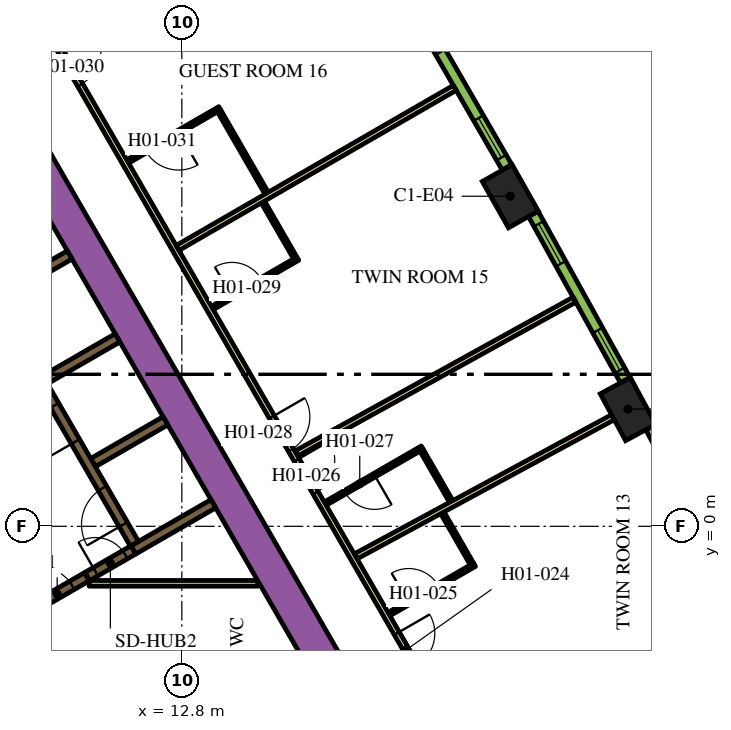
"""IFC4 building model, lengths in metres.
Left out: names, types, materials, properties, quantities, classifications, styles, units other than length and angle.
Written with IfcOpenShell. Run it as: python <this file> out.ifc"""

import sys

from ifc_helpers import new_model, si_unit, direction, frame, frame_2d, origin, origin_2d, place, context, subcontext, project, spatial, rectangle, extrude, element, fill, save


model = new_model("IFC4")
c1 = context("Model", 3, precision=1e-05, world=origin(), true_north=direction((0.0, 1.0)))
c2 = subcontext(c1, "Body", "Model", "MODEL_VIEW")
j1 = project(units=[si_unit("LENGTHUNIT", "METRE"), si_unit("PLANEANGLEUNIT", "RADIAN")], contexts=[c1])
p1 = place(None, origin())
s1 = spatial("IfcSite", under=j1, at=p1, CompositionType="ELEMENT")
p2 = place(p1, origin())
s2 = spatial("IfcBuilding", under=s1, at=p2, CompositionType="ELEMENT")
p3 = place(p2, frame((0.0, 0.0, 27.6)))
s3 = spatial("IfcBuildingStorey", under=s2, at=p3, CompositionType="ELEMENT", Elevation=27.6)
for number, where, z_axis, x_axis in (
    (1, (24.54, 3.085, 0.0), (0.0, 0.0, 1.0), (-0.476, 0.88, 0.0)),
    (2, (21.443, 8.685, 0.0), (0.0, 0.0, 1.0), (-0.492, 0.871, 0.0)),
):
    element("IfcColumn", number, at=place(p3, frame(where, z_axis=z_axis, x_axis=x_axis)), inside=s3, PredefinedType="COLUMN", context=c2, shape_type="SweptSolid", body=[
        extrude(rectangle(XDim=1.4, YDim=0.9, at=origin_2d()), origin(), (0.0, 0.0, 1.0), 3.9),
    ])
p4 = place(p3, frame((6.776, 13.364, 0.0), z_axis=(0.0, 0.0, 1.0), x_axis=(0.500004177138, -0.8660229921, 0.0)))
e3 = element("IfcWall", 3, at=p4, inside=s3, PredefinedType="SOLIDWALL", context=c2, shape_type="SweptSolid", body=[
    extrude(rectangle(XDim=20.204, YDim=0.9, at=frame_2d((10.102, 0.0))), origin(), (0.0, 0.0, 1.0), 3.9),
])
p5 = place(p3, frame((8.334, -2.964, 0.0), z_axis=(0.0, 0.0, 1.0), x_axis=(0.866016039709, -0.500016218704, 0.0)))
e4 = element("IfcWall", 4, at=p5, inside=s3, PredefinedType="SOLIDWALL", context=c2, shape_type="SweptSolid", body=[
    extrude(rectangle(XDim=7.05, YDim=0.25, at=frame_2d((3.525, 0.0))), origin(), (0.0, 0.0, 1.0), 3.9),
])
p6 = place(p3, frame((10.464, 1.677, 0.0), z_axis=(0.0, 0.0, 1.0), x_axis=(0.86605622881, 0.499946605688, 0.0)))
e5 = element("IfcWall", 5, at=p6, inside=s3, PredefinedType="SOLIDWALL", context=c2, shape_type="SweptSolid", body=[
    extrude(rectangle(XDim=2.2, YDim=0.25, at=frame_2d((1.1, 0.0))), origin(), (0.0, 0.0, 1.0), 3.9),
])
p7 = place(p3, frame((13.629, 0.594, 0.0), z_axis=(0.0, 0.0, 1.0), x_axis=(-0.866063384774, -0.499934209226, 0.0)))
e6 = element("IfcWall", 6, at=p7, inside=s3, PredefinedType="SOLIDWALL", context=c2, shape_type="SweptSolid", body=[
    extrude(rectangle(XDim=2.428, YDim=0.25, at=frame_2d((1.214, 0.0))), origin(), (0.0, 0.0, 1.0), 3.9),
])
for number, where, z_axis, x_axis in (
    (7, (7.944, 6.041, 0.0), (0.0, 0.0, 1.0), (0.866, 0.5, 0.0)),
    (8, (9.204, 3.859, 0.0), (0.0, 0.0, 1.0), (0.866, 0.5, 0.0)),
):
    element("IfcWall", number, at=place(p3, frame(where, z_axis=z_axis, x_axis=x_axis)), inside=s3, PredefinedType="SOLIDWALL", context=c2, shape_type="SweptSolid", body=[
        extrude(rectangle(XDim=2.2, YDim=0.25, at=frame_2d((1.1, 0.0))), origin(), (0.0, 0.0, 1.0), 3.9),
    ])
p8 = place(p3, frame((10.362, -1.5, 0.0), z_axis=(0.0, 0.0, 1.0), x_axis=(1.0, 0.0, 0.0)))
e9 = element("IfcWall", 9, at=p8, inside=s3, PredefinedType="PARTITIONING", context=c2, shape_type="SweptSolid", body=[
    extrude(rectangle(XDim=4.439, YDim=0.15, at=frame_2d((2.22, 0.0))), origin(), (0.0, 0.0, 1.0), 2.75),
])
p9 = place(p3, frame((11.553, -0.46, 0.0), z_axis=(0.0, 0.0, 1.0), x_axis=(-0.500006514828, 0.866021642414, 0.0)))
e10 = element("IfcWall", 10, at=p9, inside=s3, PredefinedType="SOLIDWALL", context=c2, shape_type="SweptSolid", body=[
    extrude(rectangle(XDim=12.35, YDim=0.25, at=frame_2d((6.175, 0.0))), origin(), (0.0, 0.0, 1.0), 3.9),
])
p10 = place(p9, frame((0.585, 0.0, 0.0)))
e11 = element("IfcOpeningElement", 11, at=p10, cuts=e10, PredefinedType="OPENING", context=c2, shape_type="SweptSolid", body=[
    extrude(rectangle(XDim=1.1, YDim=2.1, at=frame_2d((0.55, 1.05))), frame((0.0, 0.135, 0.0), z_axis=(0.0, -1.0, 0.0), x_axis=(1.0, 0.0, 0.0)), (0.0, 0.0, 1.0), 0.27),
])
p11 = place(p9, frame((3.105, 0.0, 0.0)))
e12 = element("IfcOpeningElement", 12, at=p11, cuts=e10, PredefinedType="OPENING", context=c2, shape_type="SweptSolid", body=[
    extrude(rectangle(XDim=1.1, YDim=2.1, at=frame_2d((0.55, 1.05))), frame((0.0, 0.135, 0.0), z_axis=(0.0, -1.0, 0.0), x_axis=(1.0, 0.0, 0.0)), (0.0, 0.0, 1.0), 0.27),
])
p12 = place(p9, frame((5.625, 0.0, 0.0)))
e13 = element("IfcOpeningElement", 13, at=p12, cuts=e10, PredefinedType="OPENING", context=c2, shape_type="SweptSolid", body=[
    extrude(rectangle(XDim=1.1, YDim=2.1, at=frame_2d((0.55, 1.05))), frame((0.0, 0.135, 0.0), z_axis=(0.0, -1.0, 0.0), x_axis=(1.0, 0.0, 0.0)), (0.0, 0.0, 1.0), 0.27),
])
p13 = place(p3, frame((8.74, -2.229, 0.0), z_axis=(0.0, 0.0, 1.0), x_axis=(0.865989075817, 0.500062916607, 0.0)))
e14 = element("IfcWall", 14, at=p13, inside=s3, PredefinedType="SOLIDWALL", context=c2, shape_type="SweptSolid", body=[
    extrude(rectangle(XDim=1.8, YDim=0.25, at=frame_2d((0.9, 0.0))), origin(), (0.0, 0.0, 1.0), 3.9),
])
p14 = place(p13, frame((0.45, 0.0, 0.0)))
e15 = element("IfcOpeningElement", 15, at=p14, cuts=e14, PredefinedType="OPENING", context=c2, shape_type="SweptSolid", body=[
    extrude(rectangle(XDim=0.9, YDim=2.1, at=frame_2d((0.45, 1.05))), frame((0.0, 0.135, 0.0), z_axis=(0.0, -1.0, 0.0), x_axis=(1.0, 0.0, 0.0)), (0.0, 0.0, 1.0), 0.27),
])
p15 = place(p3, frame((10.313, -1.32, 0.0), z_axis=(0.0, 0.0, 1.0), x_axis=(0.866034573852, 0.49998411664, 0.0)))
e16 = element("IfcWall", 16, at=p15, inside=s3, PredefinedType="SOLIDWALL", context=c2, shape_type="SweptSolid", body=[
    extrude(rectangle(XDim=1.4, YDim=0.25, at=frame_2d((0.7, 0.0))), origin(), (0.0, 0.0, 1.0), 3.9),
])
p16 = place(p15, frame((0.25, 0.0, 0.0)))
e17 = element("IfcOpeningElement", 17, at=p16, cuts=e16, PredefinedType="OPENING", context=c2, shape_type="SweptSolid", body=[
    extrude(rectangle(XDim=0.9, YDim=2.1, at=frame_2d((0.45, 1.05))), frame((0.0, 0.135, 0.0), z_axis=(0.0, -1.0, 0.0), x_axis=(1.0, 0.0, 0.0)), (0.0, 0.0, 1.0), 0.27),
])
p17 = place(p3, frame((6.163, 18.475, 0.0), z_axis=(0.0, 0.0, 1.0), x_axis=(0.500001317485, -0.866024643133, 0.0)))
e18 = element("IfcWall", 18, at=p17, inside=s3, PredefinedType="PARTITIONING", context=c2, shape_type="SweptSolid", body=[
    extrude(rectangle(XDim=25.767, YDim=0.15, at=frame_2d((12.883, 0.0))), origin(), (0.0, 0.0, 1.0), 2.75),
])
p18 = place(p17, frame((24.586, 0.0, 0.0)))
e19 = element("IfcOpeningElement", 19, at=p18, cuts=e18, PredefinedType="OPENING", context=c2, shape_type="SweptSolid", body=[
    extrude(rectangle(XDim=1.0, YDim=2.1, at=frame_2d((0.5, 1.05))), frame((0.0, 0.085, 0.0), z_axis=(0.0, -1.0, 0.0), x_axis=(1.0, 0.0, 0.0)), (0.0, 0.0, 1.0), 0.17),
])
p19 = place(p17, frame((19.319, 0.0, 0.0)))
e20 = element("IfcOpeningElement", 20, at=p19, cuts=e18, PredefinedType="OPENING", context=c2, shape_type="SweptSolid", body=[
    extrude(rectangle(XDim=1.0, YDim=2.1, at=frame_2d((0.5, 1.05))), frame((0.0, 0.085, 0.0), z_axis=(0.0, -1.0, 0.0), x_axis=(1.0, 0.0, 0.0)), (0.0, 0.0, 1.0), 0.17),
])
p20 = place(p17, frame((18.012, 0.0, 0.0)))
e21 = element("IfcOpeningElement", 21, at=p20, cuts=e18, PredefinedType="OPENING", context=c2, shape_type="SweptSolid", body=[
    extrude(rectangle(XDim=1.0, YDim=2.1, at=frame_2d((0.5, 1.05))), frame((0.0, 0.085, 0.0), z_axis=(0.0, -1.0, 0.0), x_axis=(1.0, 0.0, 0.0)), (0.0, 0.0, 1.0), 0.17),
])
p21 = place(p17, frame((6.824, 0.0, 0.0)))
e22 = element("IfcOpeningElement", 22, at=p21, cuts=e18, PredefinedType="OPENING", context=c2, shape_type="SweptSolid", body=[
    extrude(rectangle(XDim=1.1, YDim=2.1, at=frame_2d((0.55, 1.05))), frame((0.0, 0.085, 0.0), z_axis=(0.0, -1.0, 0.0), x_axis=(1.0, 0.0, 0.0)), (0.0, 0.0, 1.0), 0.17),
])
p22 = place(p17, frame((4.658, 0.0, 0.0)))
e23 = element("IfcOpeningElement", 23, at=p22, cuts=e18, PredefinedType="OPENING", context=c2, shape_type="SweptSolid", body=[
    extrude(rectangle(XDim=0.9, YDim=2.1, at=frame_2d((0.45, 1.05))), frame((0.0, 0.085, 0.0), z_axis=(0.0, -1.0, 0.0), x_axis=(1.0, 0.0, 0.0)), (0.0, 0.0, 1.0), 0.17),
])
p23 = place(p17, frame((0.18, 0.0, 0.0)))
e24 = element("IfcOpeningElement", 24, at=p23, cuts=e18, PredefinedType="OPENING", context=c2, shape_type="SweptSolid", body=[
    extrude(rectangle(XDim=1.0, YDim=2.1, at=frame_2d((0.5, 1.05))), frame((0.0, 0.085, 0.0), z_axis=(0.0, -1.0, 0.0), x_axis=(1.0, 0.0, 0.0)), (0.0, 0.0, 1.0), 0.17),
])
p24 = place(p3, frame((19.982, 11.537, 0.0), z_axis=(0.0, 0.0, 1.0), x_axis=(-0.866020994654, -0.500007636761, 0.0)))
e25 = element("IfcWall", 25, at=p24, inside=s3, PredefinedType="PARTITIONING", context=c2, shape_type="SweptSolid", body=[
    extrude(rectangle(XDim=8.423, YDim=0.15, at=frame_2d((4.211, 0.0))), origin(), (0.0, 0.0, 1.0), 2.75),
])
p25 = place(p3, frame((23.132, 5.962, 0.0), z_axis=(0.0, 0.0, 1.0), x_axis=(-0.875121716713, -0.483902863121, 0.0)))
e26 = element("IfcWall", 26, at=p25, inside=s3, PredefinedType="PARTITIONING", context=c2, shape_type="SweptSolid", body=[
    extrude(rectangle(XDim=8.355, YDim=0.15, at=frame_2d((4.178, 0.0))), origin(), (0.0, 0.0, 1.0), 2.75),
])
p26 = place(p3, frame((27.134, -2.779, 0.0), z_axis=(0.0, 0.0, 1.0), x_axis=(-0.8882049501, -0.459447457951, 0.0)))
e27 = element("IfcWall", 27, at=p26, inside=s3, PredefinedType="PARTITIONING", context=c2, shape_type="SweptSolid", body=[
    extrude(rectangle(XDim=11.638, YDim=0.15, at=frame_2d((5.819, 0.0))), origin(), (0.0, 0.0, 1.0), 2.75),
])
p27 = place(p3, frame((24.145, 2.871, 0.0), z_axis=(0.0, 0.0, 1.0), x_axis=(-0.879551725039, -0.475803281809, 0.0)))
e28 = element("IfcWall", 28, at=p27, inside=s3, PredefinedType="PARTITIONING", context=c2, shape_type="SweptSolid", body=[
    extrude(rectangle(XDim=7.688, YDim=0.15, at=frame_2d((3.844, 0.0))), origin(), (0.0, 0.0, 1.0), 2.75),
])
p28 = place(p3, frame((18.25, -2.311, 0.0), z_axis=(0.0, 0.0, 1.0), x_axis=(0.866021400173, 0.500006934395, 0.0)))
e29 = element("IfcWall", 29, at=p28, inside=s3, PredefinedType="PARTITIONING", context=c2, shape_type="SweptSolid", body=[
    extrude(rectangle(XDim=2.6, YDim=0.1, at=frame_2d((1.3, 0.0))), origin(), (0.0, 0.0, 1.0), 2.75),
])
p29 = place(p28, frame((0.6, 0.0, 0.0)))
e30 = element("IfcOpeningElement", 30, at=p29, cuts=e29, PredefinedType="OPENING", context=c2, shape_type="SweptSolid", body=[
    extrude(rectangle(XDim=0.9, YDim=2.1, at=frame_2d((0.45, 1.05))), frame((0.0, 0.06, 0.0), z_axis=(0.0, -1.0, 0.0), x_axis=(1.0, 0.0, 0.0)), (0.0, 0.0, 1.0), 0.12),
])
p30 = place(p3, frame((20.434, -0.993, 0.0), z_axis=(0.0, 0.0, 1.0), x_axis=(-0.500086022567, 0.865975732936, 0.0)))
e31 = element("IfcWall", 31, at=p30, inside=s3, PredefinedType="PARTITIONING", context=c2, shape_type="SweptSolid", body=[
    extrude(rectangle(XDim=1.55, YDim=0.1, at=frame_2d((0.775, 0.0))), origin(), (0.0, 0.0, 1.0), 2.75),
])
p31 = place(p3, frame((19.127, 2.071, 0.0), z_axis=(0.0, 0.0, 1.0), x_axis=(-0.866003658127, -0.500037662692, 0.0)))
e32 = element("IfcWall", 32, at=p31, inside=s3, PredefinedType="PARTITIONING", context=c2, shape_type="SweptSolid", body=[
    extrude(rectangle(XDim=2.95, YDim=0.1, at=frame_2d((1.475, 0.0))), origin(), (0.0, 0.0, 1.0), 2.75),
])
p32 = place(p31, frame((1.45, 0.0, 0.0)))
e33 = element("IfcOpeningElement", 33, at=p32, cuts=e32, PredefinedType="OPENING", context=c2, shape_type="SweptSolid", body=[
    extrude(rectangle(XDim=0.9, YDim=2.1, at=frame_2d((0.45, 1.05))), frame((0.0, 0.06, 0.0), z_axis=(0.0, -1.0, 0.0), x_axis=(1.0, 0.0, 0.0)), (0.0, 0.0, 1.0), 0.12),
])
p33 = place(p3, frame((19.109, 2.002, 0.0), z_axis=(0.0, 0.0, 1.0), x_axis=(0.500086022567, -0.865975732936, 0.0)))
e34 = element("IfcWall", 34, at=p33, inside=s3, PredefinedType="PARTITIONING", context=c2, shape_type="SweptSolid", body=[
    extrude(rectangle(XDim=1.55, YDim=0.1, at=frame_2d((0.775, 0.0))), origin(), (0.0, 0.0, 1.0), 2.75),
])
p34 = place(p3, frame((13.6, 5.744, 0.0), z_axis=(0.0, 0.0, 1.0), x_axis=(0.866021400173, 0.500006934395, 0.0)))
e35 = element("IfcWall", 35, at=p34, inside=s3, PredefinedType="PARTITIONING", context=c2, shape_type="SweptSolid", body=[
    extrude(rectangle(XDim=2.6, YDim=0.1, at=frame_2d((1.3, 0.0))), origin(), (0.0, 0.0, 1.0), 2.75),
])
p35 = place(p34, frame((0.6, 0.0, 0.0)))
e36 = element("IfcOpeningElement", 36, at=p35, cuts=e35, PredefinedType="OPENING", context=c2, shape_type="SweptSolid", body=[
    extrude(rectangle(XDim=0.9, YDim=2.1, at=frame_2d((0.45, 1.05))), frame((0.0, 0.06, 0.0), z_axis=(0.0, -1.0, 0.0), x_axis=(1.0, 0.0, 0.0)), (0.0, 0.0, 1.0), 0.12),
])
p36 = place(p3, frame((15.779, 7.071, 0.0), z_axis=(0.0, 0.0, 1.0), x_axis=(-0.499976720371, 0.866038843867, 0.0)))
e37 = element("IfcWall", 37, at=p36, inside=s3, PredefinedType="PARTITIONING", context=c2, shape_type="SweptSolid", body=[
    extrude(rectangle(XDim=1.69, YDim=0.1, at=frame_2d((0.845, 0.0))), origin(), (0.0, 0.0, 1.0), 2.75),
])
p37 = place(p3, frame((13.799, 10.999, 0.0), z_axis=(0.0, 0.0, 1.0), x_axis=(-0.866034573852, -0.49998411664, 0.0)))
e38 = element("IfcWall", 38, at=p37, inside=s3, PredefinedType="PARTITIONING", context=c2, shape_type="SweptSolid", body=[
    extrude(rectangle(XDim=2.8, YDim=0.1, at=frame_2d((1.4, 0.0))), origin(), (0.0, 0.0, 1.0), 2.75),
])
p38 = place(p37, frame((1.25, 0.0, 0.0)))
e39 = element("IfcOpeningElement", 39, at=p38, cuts=e38, PredefinedType="OPENING", context=c2, shape_type="SweptSolid", body=[
    extrude(rectangle(XDim=1.0, YDim=2.1, at=frame_2d((0.5, 1.05))), frame((0.0, 0.06, 0.0), z_axis=(0.0, -1.0, 0.0), x_axis=(1.0, 0.0, 0.0)), (0.0, 0.0, 1.0), 0.12),
])
p39 = place(p3, frame((13.781, 10.931, 0.0), z_axis=(0.0, 0.0, 1.0), x_axis=(0.500004234368, -0.866022959057, 0.0)))
e40 = element("IfcWall", 40, at=p39, inside=s3, PredefinedType="PARTITIONING", context=c2, shape_type="SweptSolid", body=[
    extrude(rectangle(XDim=2.5, YDim=0.1, at=frame_2d((1.25, 0.0))), origin(), (0.0, 0.0, 1.0), 2.75),
])
p40 = place(p3, frame((27.475, -1.81, 0.0), z_axis=(0.0, 0.0, 1.0), x_axis=(-0.467629620899, 0.883924509026, 0.0)))
e41 = element("IfcWall", 41, at=p40, inside=s3, PredefinedType="SOLIDWALL", context=c2, shape_type="SweptSolid", body=[
    extrude(rectangle(XDim=4.998, YDim=0.29, at=frame_2d((2.499, 0.0))), origin(), (0.0, 0.0, 1.0), 3.65),
])
p41 = place(p40, frame((0.297, 0.0, 0.9)))
e42 = element("IfcOpeningElement", 42, at=p41, cuts=e41, PredefinedType="OPENING", context=c2, shape_type="SweptSolid", body=[
    extrude(rectangle(XDim=1.2, YDim=2.15, at=frame_2d((0.6, 1.075))), frame((0.0, 0.155, 0.0), z_axis=(0.0, -1.0, 0.0), x_axis=(1.0, 0.0, 0.0)), (0.0, 0.0, 1.0), 0.31),
])
p42 = place(p40, frame((3.501, 0.0, 0.9)))
e43 = element("IfcOpeningElement", 43, at=p42, cuts=e41, PredefinedType="OPENING", context=c2, shape_type="SweptSolid", body=[
    extrude(rectangle(XDim=1.2, YDim=2.15, at=frame_2d((0.6, 1.075))), frame((0.0, 0.155, 0.0), z_axis=(0.0, -1.0, 0.0), x_axis=(1.0, 0.0, 0.0)), (0.0, 0.0, 1.0), 0.31),
])
p43 = place(p3, frame((24.468, 3.846, 0.0), z_axis=(0.0, 0.0, 1.0), x_axis=(-0.483912572871, 0.875116347589, 0.0)))
e44 = element("IfcWall", 44, at=p43, inside=s3, PredefinedType="SOLIDWALL", context=c2, shape_type="SweptSolid", body=[
    extrude(rectangle(XDim=4.998, YDim=0.29, at=frame_2d((2.499, 0.0))), origin(), (0.0, 0.0, 1.0), 3.65),
])
p44 = place(p43, frame((0.297, 0.0, 0.9)))
e45 = element("IfcOpeningElement", 45, at=p44, cuts=e44, PredefinedType="OPENING", context=c2, shape_type="SweptSolid", body=[
    extrude(rectangle(XDim=1.2, YDim=2.15, at=frame_2d((0.6, 1.075))), frame((0.0, 0.155, 0.0), z_axis=(0.0, -1.0, 0.0), x_axis=(1.0, 0.0, 0.0)), (0.0, 0.0, 1.0), 0.31),
])
p45 = place(p43, frame((3.501, 0.0, 0.9)))
e46 = element("IfcOpeningElement", 46, at=p45, cuts=e44, PredefinedType="OPENING", context=c2, shape_type="SweptSolid", body=[
    extrude(rectangle(XDim=1.2, YDim=2.15, at=frame_2d((0.6, 1.075))), frame((0.0, 0.155, 0.0), z_axis=(0.0, -1.0, 0.0), x_axis=(1.0, 0.0, 0.0)), (0.0, 0.0, 1.0), 0.31),
])
p46 = place(p3, frame((21.357, 9.445, 0.0), z_axis=(0.0, 0.0, 1.0), x_axis=(-0.50002123722, 0.866013142123, 0.0)))
e47 = element("IfcWall", 47, at=p46, inside=s3, PredefinedType="SOLIDWALL", context=c2, shape_type="SweptSolid", body=[
    extrude(rectangle(XDim=4.998, YDim=0.29, at=frame_2d((2.499, 0.0))), origin(), (0.0, 0.0, 1.0), 3.65),
])
p47 = place(p46, frame((0.297, 0.0, 0.9)))
e48 = element("IfcOpeningElement", 48, at=p47, cuts=e47, PredefinedType="OPENING", context=c2, shape_type="SweptSolid", body=[
    extrude(rectangle(XDim=1.2, YDim=2.15, at=frame_2d((0.6, 1.075))), frame((0.0, 0.155, 0.0), z_axis=(0.0, -1.0, 0.0), x_axis=(1.0, 0.0, 0.0)), (0.0, 0.0, 1.0), 0.31),
])
p48 = place(p46, frame((3.501, 0.0, 0.9)))
e49 = element("IfcOpeningElement", 49, at=p48, cuts=e47, PredefinedType="OPENING", context=c2, shape_type="SweptSolid", body=[
    extrude(rectangle(XDim=1.2, YDim=2.15, at=frame_2d((0.6, 1.075))), frame((0.0, 0.155, 0.0), z_axis=(0.0, -1.0, 0.0), x_axis=(1.0, 0.0, 0.0)), (0.0, 0.0, 1.0), 0.31),
])
p49 = place(p10, origin())
e50 = element("IfcDoor", 50, at=p49, inside=s3, OperationType="DOUBLE_DOOR_SLIDING", PredefinedType="DOOR", context=c2, shape_type="SweptSolid", body=[
    extrude(rectangle(XDim=1.1, YDim=2.1, at=frame_2d((0.55, 1.05))), frame((0.0, 0.025, 0.0), z_axis=(0.0, -1.0, 0.0), x_axis=(1.0, 0.0, 0.0)), (0.0, 0.0, 1.0), 0.05),
])
fill(e11, e50)
p50 = place(p11, origin())
e51 = element("IfcDoor", 51, at=p50, inside=s3, OperationType="DOUBLE_DOOR_SLIDING", PredefinedType="DOOR", context=c2, shape_type="SweptSolid", body=[
    extrude(rectangle(XDim=1.1, YDim=2.1, at=frame_2d((0.55, 1.05))), frame((0.0, 0.025, 0.0), z_axis=(0.0, -1.0, 0.0), x_axis=(1.0, 0.0, 0.0)), (0.0, 0.0, 1.0), 0.05),
])
fill(e12, e51)
p51 = place(p14, origin())
e52 = element("IfcDoor", 52, at=p51, inside=s3, OperationType="SINGLE_SWING_LEFT", PredefinedType="DOOR", context=c2, shape_type="SweptSolid", body=[
    extrude(rectangle(XDim=0.9, YDim=2.1, at=frame_2d((0.45, 1.05))), frame((0.0, 0.025, 0.0), z_axis=(0.0, -1.0, 0.0), x_axis=(1.0, 0.0, 0.0)), (0.0, 0.0, 1.0), 0.05),
])
fill(e15, e52)
p52 = place(p16, origin())
e53 = element("IfcDoor", 53, at=p52, inside=s3, OperationType="SINGLE_SWING_LEFT", PredefinedType="DOOR", context=c2, shape_type="SweptSolid", body=[
    extrude(rectangle(XDim=0.9, YDim=2.1, at=frame_2d((0.45, 1.05))), frame((0.0, 0.025, 0.0), z_axis=(0.0, -1.0, 0.0), x_axis=(1.0, 0.0, 0.0)), (0.0, 0.0, 1.0), 0.05),
])
fill(e17, e53)
p53 = place(p18, origin())
e54 = element("IfcDoor", 54, at=p53, inside=s3, OperationType="SINGLE_SWING_RIGHT", PredefinedType="DOOR", context=c2, shape_type="SweptSolid", body=[
    extrude(rectangle(XDim=1.0, YDim=2.1, at=frame_2d((0.5, 1.05))), frame((0.0, 0.025, 0.0), z_axis=(0.0, -1.0, 0.0), x_axis=(1.0, 0.0, 0.0)), (0.0, 0.0, 1.0), 0.05),
])
fill(e19, e54)
p54 = place(p29, origin())
e55 = element("IfcDoor", 55, at=p54, inside=s3, OperationType="SINGLE_SWING_LEFT", PredefinedType="DOOR", context=c2, shape_type="SweptSolid", body=[
    extrude(rectangle(XDim=0.9, YDim=2.1, at=frame_2d((0.45, 1.05))), frame((0.0, 0.025, 0.0), z_axis=(0.0, -1.0, 0.0), x_axis=(1.0, 0.0, 0.0)), (0.0, 0.0, 1.0), 0.05),
])
fill(e30, e55)
p55 = place(p19, origin())
e56 = element("IfcDoor", 56, at=p55, inside=s3, OperationType="SINGLE_SWING_LEFT", PredefinedType="DOOR", context=c2, shape_type="SweptSolid", body=[
    extrude(rectangle(XDim=1.0, YDim=2.1, at=frame_2d((0.5, 1.05))), frame((0.0, 0.025, 0.0), z_axis=(0.0, -1.0, 0.0), x_axis=(1.0, 0.0, 0.0)), (0.0, 0.0, 1.0), 0.05),
])
fill(e20, e56)
p56 = place(p32, origin())
e57 = element("IfcDoor", 57, at=p56, inside=s3, OperationType="SINGLE_SWING_LEFT", PredefinedType="DOOR", context=c2, shape_type="SweptSolid", body=[
    extrude(rectangle(XDim=0.9, YDim=2.1, at=frame_2d((0.45, 1.05))), frame((0.0, 0.025, 0.0), z_axis=(0.0, -1.0, 0.0), x_axis=(1.0, 0.0, 0.0)), (0.0, 0.0, 1.0), 0.05),
])
fill(e33, e57)
p57 = place(p20, origin())
e58 = element("IfcDoor", 58, at=p57, inside=s3, OperationType="SINGLE_SWING_RIGHT", PredefinedType="DOOR", context=c2, shape_type="SweptSolid", body=[
    extrude(rectangle(XDim=1.0, YDim=2.1, at=frame_2d((0.5, 1.05))), frame((0.0, 0.025, 0.0), z_axis=(0.0, -1.0, 0.0), x_axis=(1.0, 0.0, 0.0)), (0.0, 0.0, 1.0), 0.05),
])
fill(e21, e58)
p58 = place(p35, origin())
e59 = element("IfcDoor", 59, at=p58, inside=s3, OperationType="SINGLE_SWING_RIGHT", PredefinedType="DOOR", context=c2, shape_type="SweptSolid", body=[
    extrude(rectangle(XDim=0.9, YDim=2.1, at=frame_2d((0.45, 1.05))), frame((0.0, 0.025, 0.0), z_axis=(0.0, -1.0, 0.0), x_axis=(1.0, 0.0, 0.0)), (0.0, 0.0, 1.0), 0.05),
])
fill(e36, e59)
p59 = place(p21, origin())
e60 = element("IfcDoor", 60, at=p59, inside=s3, OperationType="SINGLE_SWING_LEFT", PredefinedType="DOOR", context=c2, shape_type="SweptSolid", body=[
    extrude(rectangle(XDim=1.1, YDim=2.1, at=frame_2d((0.55, 1.05))), frame((0.0, 0.025, 0.0), z_axis=(0.0, -1.0, 0.0), x_axis=(1.0, 0.0, 0.0)), (0.0, 0.0, 1.0), 0.05),
])
fill(e22, e60)
p60 = place(p38, origin())
e61 = element("IfcDoor", 61, at=p60, inside=s3, OperationType="SINGLE_SWING_LEFT", PredefinedType="DOOR", context=c2, shape_type="SweptSolid", body=[
    extrude(rectangle(XDim=1.0, YDim=2.1, at=frame_2d((0.5, 1.05))), frame((0.0, 0.025, 0.0), z_axis=(0.0, -1.0, 0.0), x_axis=(1.0, 0.0, 0.0)), (0.0, 0.0, 1.0), 0.05),
])
fill(e39, e61)
p61 = place(p44, origin())
e62 = element("IfcWindow", 62, at=p61, inside=s3, PartitioningType="DOUBLE_PANEL_VERTICAL", PredefinedType="WINDOW", context=c2, shape_type="SweptSolid", body=[
    extrude(rectangle(XDim=1.2, YDim=2.15, at=frame_2d((0.6, 1.075))), frame((0.0, 0.015, 0.0), z_axis=(0.0, -1.0, 0.0), x_axis=(1.0, 0.0, 0.0)), (0.0, 0.0, 1.0), 0.06),
])
fill(e45, e62)
p62 = place(p45, origin())
e63 = element("IfcWindow", 63, at=p62, inside=s3, PartitioningType="DOUBLE_PANEL_VERTICAL", PredefinedType="WINDOW", context=c2, shape_type="SweptSolid", body=[
    extrude(rectangle(XDim=1.2, YDim=2.15, at=frame_2d((0.6, 1.075))), frame((0.0, 0.015, 0.0), z_axis=(0.0, -1.0, 0.0), x_axis=(1.0, 0.0, 0.0)), (0.0, 0.0, 1.0), 0.06),
])
fill(e46, e63)
p63 = place(p47, origin())
e64 = element("IfcWindow", 64, at=p63, inside=s3, PartitioningType="DOUBLE_PANEL_VERTICAL", PredefinedType="WINDOW", context=c2, shape_type="SweptSolid", body=[
    extrude(rectangle(XDim=1.2, YDim=2.15, at=frame_2d((0.6, 1.075))), frame((0.0, 0.015, 0.0), z_axis=(0.0, -1.0, 0.0), x_axis=(1.0, 0.0, 0.0)), (0.0, 0.0, 1.0), 0.06),
])
fill(e48, e64)
p64 = place(p48, origin())
e65 = element("IfcWindow", 65, at=p64, inside=s3, PartitioningType="DOUBLE_PANEL_VERTICAL", PredefinedType="WINDOW", context=c2, shape_type="SweptSolid", body=[
    extrude(rectangle(XDim=1.2, YDim=2.15, at=frame_2d((0.6, 1.075))), frame((0.0, 0.015, 0.0), z_axis=(0.0, -1.0, 0.0), x_axis=(1.0, 0.0, 0.0)), (0.0, 0.0, 1.0), 0.06),
])
fill(e49, e65)
save(model, sys.argv[1])
